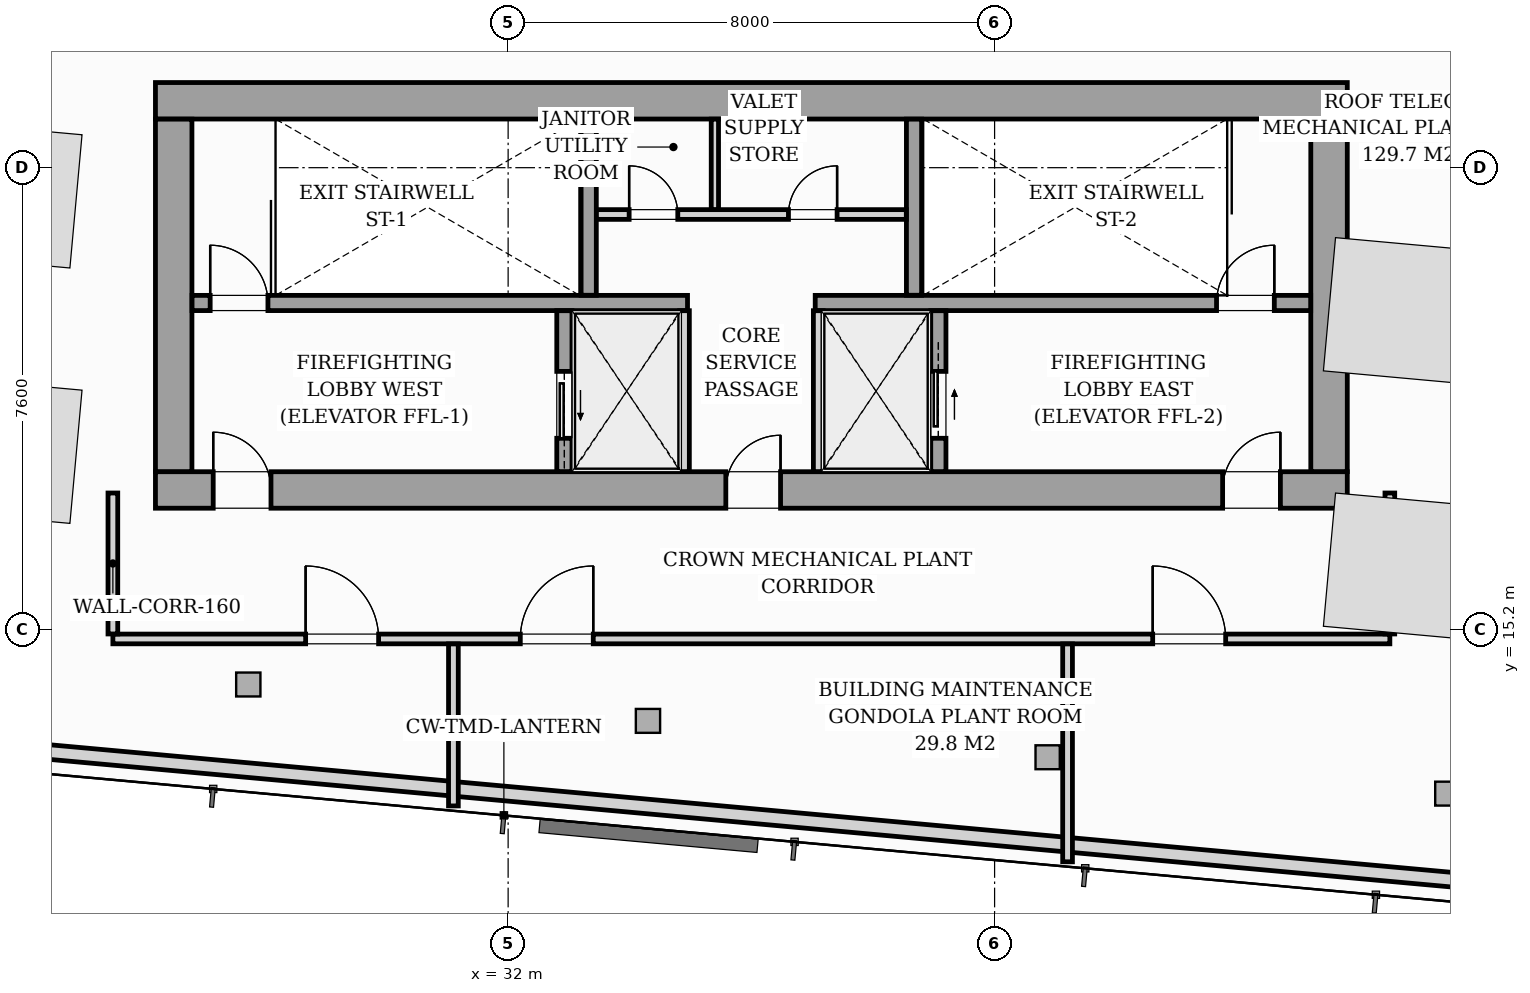
"""IFC4 building model, lengths in metres.
Left out: names, types, materials, properties, quantities, classifications, styles, units other than length and angle.
Written with IfcOpenShell. Run it as: python <this file> out.ifc"""

import sys

from ifc_helpers import new_model, si_unit, direction, frame, frame_2d, origin, origin_2d, place, context, subcontext, project, spatial, rectangle, i_section, extrude, source, transform, mapped, element, fill, save


model = new_model("IFC4")
c1 = context("Model", 3, precision=1e-05, world=origin(), true_north=direction((0.0, 1.0)))
c2 = subcontext(c1, "Body", "Model", "MODEL_VIEW")
j1 = project(units=[si_unit("LENGTHUNIT", "METRE"), si_unit("PLANEANGLEUNIT", "RADIAN")], contexts=[c1])
p1 = place(None, origin())
s1 = spatial("IfcSite", under=j1, at=p1, CompositionType="ELEMENT")
p2 = place(p1, origin())
s2 = spatial("IfcBuilding", under=s1, at=p2, CompositionType="ELEMENT")
p3 = place(p2, frame((0.0, 0.0, 290.3)))
s3 = spatial("IfcBuildingStorey", under=s2, at=p3, CompositionType="ELEMENT", Elevation=290.3)
m1 = source(origin(), c2, "Body", "SweptSolid", [
    extrude(i_section(OverallWidth=0.404, OverallDepth=0.407, WebThickness=0.027, FlangeThickness=0.044, FilletRadius=0.018, at=origin_2d()), origin(), (0.0, 0.0, 1.0), 6.496),
])
for number, where, z_axis, x_axis in (
    (1, (26.4, 17.4, 0.002), (0.0, 0.0, 1.0), (1.0, 0.0, 0.0)),
    (2, (33.12, 17.4, 0.002), (0.0, 0.0, 1.0), (1.0, 0.0, 0.0)),
    (3, (38.88, 17.4, 0.002), (0.0, 0.0, 1.0), (1.0, 0.0, 0.0)),
    (4, (45.6, 17.4, 0.002), (0.0, 0.0, 1.0), (1.0, 0.0, 0.0)),
    (5, (26.4, 24.0, 0.002), (0.0, 0.0, 1.0), (1.0, 0.0, 0.0)),
    (6, (33.12, 24.0, 0.002), (0.0, 0.0, 1.0), (1.0, 0.0, 0.0)),
    (7, (38.88, 24.0, 0.002), (0.0, 0.0, 1.0), (1.0, 0.0, 0.0)),
    (8, (45.6, 24.0, 0.002), (0.0, 0.0, 1.0), (1.0, 0.0, 0.0)),
):
    element("IfcColumn", number, at=place(p3, frame(where, z_axis=z_axis, x_axis=x_axis)), inside=s3, PredefinedType="PILASTER", context=c2, shape_type="MappedRepresentation", body=[
        mapped(m1, transform((0.0, 0.0, 0.0), scale=1.0)),
    ])
m2 = source(origin(), c2, "Body", "SweptSolid", [
    extrude(i_section(OverallWidth=0.399, OverallDepth=0.393, WebThickness=0.023, FlangeThickness=0.037, FilletRadius=0.018, at=origin_2d()), origin(), (0.0, 0.0, 1.0), 6.496),
])
for number, where, z_axis, x_axis in (
    (9, (27.727, 14.301, 0.002), (0.0, 0.0, 1.0), (0.996, -0.091, 0.0)),
    (10, (34.3, 13.703, 0.002), (0.0, 0.0, 1.0), (0.996, -0.091, 0.0)),
    (11, (40.873, 13.104, 0.002), (0.0, 0.0, 1.0), (0.996, -0.091, 0.0)),
    (12, (47.445, 12.506, 0.002), (0.0, 0.0, 1.0), (0.996, -0.091, 0.0)),
):
    element("IfcColumn", number, at=place(p3, frame(where, z_axis=z_axis, x_axis=x_axis)), inside=s3, PredefinedType="COLUMN", context=c2, shape_type="MappedRepresentation", body=[
        mapped(m2, transform((0.0, 0.0, 0.0), scale=1.0)),
    ])
p4 = place(p3, frame((50.725, 10.799, 6.5), z_axis=(0.0, 0.0, 1.0), x_axis=(-0.995884437615, 0.090632151664, 0.0)))
e13 = element("IfcWall", 13, at=p4, inside=s3, PredefinedType="PARAPET", context=c2, shape_type="SweptSolid", body=[
    extrude(rectangle(XDim=32.88, YDim=0.24, at=frame_2d((16.44, 0.0))), origin(), (0.0, 0.0, 1.0), 1.25),
])
p5 = place(p3, frame((26.2, 17.5, 0.0), z_axis=(0.0, 0.0, 1.0), x_axis=(1.0, 0.0, 0.0)))
e14 = element("IfcWall", 14, at=p5, inside=s3, PredefinedType="SHEAR", context=c2, shape_type="SweptSolid", body=[
    extrude(rectangle(XDim=19.6, YDim=0.6, at=frame_2d((9.8, 0.0))), origin(), (0.0, 0.0, 1.0), 6.5),
])
p6 = place(p5, frame((0.95, 0.0, 0.0)))
e15 = element("IfcOpeningElement", 15, at=p6, cuts=e14, PredefinedType="OPENING", context=c2, shape_type="SweptSolid", body=[
    extrude(rectangle(XDim=0.95, YDim=2.06, at=frame_2d((0.475, 1.03))), frame((0.0, 0.31, 0.0), z_axis=(0.0, -1.0, 0.0), x_axis=(1.0, 0.0, 0.0)), (0.0, 0.0, 1.0), 0.62),
])
p7 = place(p5, frame((9.38, 0.0, 0.0)))
e16 = element("IfcOpeningElement", 16, at=p7, cuts=e14, PredefinedType="OPENING", context=c2, shape_type="SweptSolid", body=[
    extrude(rectangle(XDim=0.9, YDim=2.06, at=frame_2d((0.45, 1.03))), frame((0.0, 0.31, 0.0), z_axis=(0.0, -1.0, 0.0), x_axis=(1.0, 0.0, 0.0)), (0.0, 0.0, 1.0), 0.62),
])
p8 = place(p5, frame((17.55, 0.0, 0.0)))
e17 = element("IfcOpeningElement", 17, at=p8, cuts=e14, PredefinedType="OPENING", context=c2, shape_type="SweptSolid", body=[
    extrude(rectangle(XDim=0.95, YDim=2.06, at=frame_2d((0.475, 1.03))), frame((0.0, 0.31, 0.0), z_axis=(0.0, -1.0, 0.0), x_axis=(1.0, 0.0, 0.0)), (0.0, 0.0, 1.0), 0.62),
])
p9 = place(p3, frame((26.2, 23.9, 0.0), z_axis=(0.0, 0.0, 1.0), x_axis=(1.0, 0.0, 0.0)))
e18 = element("IfcWall", 18, at=p9, inside=s3, PredefinedType="SHEAR", context=c2, shape_type="SweptSolid", body=[
    extrude(rectangle(XDim=19.6, YDim=0.6, at=frame_2d((9.8, 0.0))), origin(), (0.0, 0.0, 1.0), 6.5),
])
for number, where, z_axis, x_axis in (
    (19, (26.5, 17.802, 0.0), (0.0, 0.0, 1.0), (0.0, 1.0, 0.0)),
    (20, (45.5, 17.802, 0.0), (0.0, 0.0, 1.0), (0.0, 1.0, 0.0)),
):
    element("IfcWall", number, at=place(p3, frame(where, z_axis=z_axis, x_axis=x_axis)), inside=s3, PredefinedType="SHEAR", context=c2, shape_type="SweptSolid", body=[
        extrude(rectangle(XDim=5.796, YDim=0.6, at=frame_2d((2.898, 0.0))), origin(), (0.0, 0.0, 1.0), 6.5),
    ])
p10 = place(p3, frame((26.802, 20.575, 0.0), z_axis=(0.0, 0.0, 1.0), x_axis=(1.0, 0.0, 0.0)))
e21 = element("IfcWall", 21, at=p10, inside=s3, PredefinedType="SOLIDWALL", context=c2, shape_type="SweptSolid", body=[
    extrude(rectangle(XDim=8.148, YDim=0.25, at=frame_2d((4.074, 0.0))), origin(), (0.0, 0.0, 1.0), 6.5),
])
p11 = place(p10, frame((0.298, 0.0, 0.0)))
e22 = element("IfcOpeningElement", 22, at=p11, cuts=e21, PredefinedType="OPENING", context=c2, shape_type="SweptSolid", body=[
    extrude(rectangle(XDim=0.95, YDim=2.06, at=frame_2d((0.475, 1.03))), frame((0.0, 0.135, 0.0), z_axis=(0.0, -1.0, 0.0), x_axis=(1.0, 0.0, 0.0)), (0.0, 0.0, 1.0), 0.27),
])
p12 = place(p3, frame((37.05, 20.575, 0.0), z_axis=(0.0, 0.0, 1.0), x_axis=(1.0, 0.0, 0.0)))
e23 = element("IfcWall", 23, at=p12, inside=s3, PredefinedType="SOLIDWALL", context=c2, shape_type="SweptSolid", body=[
    extrude(rectangle(XDim=8.148, YDim=0.25, at=frame_2d((4.074, 0.0))), origin(), (0.0, 0.0, 1.0), 6.5),
])
p13 = place(p12, frame((6.6, 0.0, 0.0)))
e24 = element("IfcOpeningElement", 24, at=p13, cuts=e23, PredefinedType="OPENING", context=c2, shape_type="SweptSolid", body=[
    extrude(rectangle(XDim=0.95, YDim=2.06, at=frame_2d((0.475, 1.03))), frame((0.0, 0.135, 0.0), z_axis=(0.0, -1.0, 0.0), x_axis=(1.0, 0.0, 0.0)), (0.0, 0.0, 1.0), 0.27),
])
for number, where, z_axis, x_axis in (
    (25, (33.325, 20.702, 0.0), (0.0, 0.0, 1.0), (0.0, 1.0, 0.0)),
    (26, (38.675, 20.702, 0.0), (0.0, 0.0, 1.0), (0.0, 1.0, 0.0)),
):
    element("IfcWall", number, at=place(p3, frame(where, z_axis=z_axis, x_axis=x_axis)), inside=s3, PredefinedType="SOLIDWALL", context=c2, shape_type="SweptSolid", body=[
        extrude(rectangle(XDim=2.896, YDim=0.25, at=frame_2d((1.448, 0.0))), origin(), (0.0, 0.0, 1.0), 6.5),
    ])
p14 = place(p3, frame((32.925, 17.802, 0.0), z_axis=(0.0, 0.0, 1.0), x_axis=(0.0, 1.0, 0.0)))
e27 = element("IfcWall", 27, at=p14, inside=s3, PredefinedType="SOLIDWALL", context=c2, shape_type="SweptSolid", body=[
    extrude(rectangle(XDim=2.646, YDim=0.25, at=frame_2d((1.323, 0.0))), origin(), (0.0, 0.0, 1.0), 6.5),
])
p15 = place(p14, frame((0.548, 0.0, 0.0)))
e28 = element("IfcOpeningElement", 28, at=p15, cuts=e27, PredefinedType="OPENING", context=c2, shape_type="SweptSolid", body=[
    extrude(rectangle(XDim=1.1, YDim=2.08, at=frame_2d((0.55, 1.04))), frame((0.0, 0.135, 0.0), z_axis=(0.0, -1.0, 0.0), x_axis=(1.0, 0.0, 0.0)), (0.0, 0.0, 1.0), 0.27),
])
for number, where, z_axis, x_axis in (
    (29, (34.9, 17.802, 0.0), (0.0, 0.0, 1.0), (0.0, 1.0, 0.0)),
    (30, (37.1, 17.802, 0.0), (0.0, 0.0, 1.0), (0.0, 1.0, 0.0)),
):
    element("IfcWall", number, at=place(p3, frame(where, z_axis=z_axis, x_axis=x_axis)), inside=s3, PredefinedType="PARTITIONING", context=c2, shape_type="SweptSolid", body=[
        extrude(rectangle(XDim=2.646, YDim=0.16, at=frame_2d((1.323, 0.0))), origin(), (0.0, 0.0, 1.0), 6.22),
    ])
p16 = place(p3, frame((39.075, 17.802, 0.0), z_axis=(0.0, 0.0, 1.0), x_axis=(0.0, 1.0, 0.0)))
e31 = element("IfcWall", 31, at=p16, inside=s3, PredefinedType="SOLIDWALL", context=c2, shape_type="SweptSolid", body=[
    extrude(rectangle(XDim=2.646, YDim=0.25, at=frame_2d((1.323, 0.0))), origin(), (0.0, 0.0, 1.0), 6.5),
])
p17 = place(p16, frame((0.548, 0.0, 0.0)))
e32 = element("IfcOpeningElement", 32, at=p17, cuts=e31, PredefinedType="OPENING", context=c2, shape_type="SweptSolid", body=[
    extrude(rectangle(XDim=1.1, YDim=2.08, at=frame_2d((0.55, 1.04))), frame((0.0, 0.135, 0.0), z_axis=(0.0, -1.0, 0.0), x_axis=(1.0, 0.0, 0.0)), (0.0, 0.0, 1.0), 0.27),
])
p18 = place(p3, frame((33.452, 22.03, 0.0), z_axis=(0.0, 0.0, 1.0), x_axis=(1.0, 0.0, 0.0)))
e33 = element("IfcWall", 33, at=p18, inside=s3, PredefinedType="PARTITIONING", context=c2, shape_type="SweptSolid", body=[
    extrude(rectangle(XDim=5.096, YDim=0.16, at=frame_2d((2.548, 0.0))), origin(), (0.0, 0.0, 1.0), 6.22),
])
p19 = place(p18, frame((0.538, 0.0, 0.0)))
e34 = element("IfcOpeningElement", 34, at=p19, cuts=e33, PredefinedType="OPENING", context=c2, shape_type="SweptSolid", body=[
    extrude(rectangle(XDim=0.8, YDim=2.05, at=frame_2d((0.4, 1.025))), frame((0.0, 0.09, 0.0), z_axis=(0.0, -1.0, 0.0), x_axis=(1.0, 0.0, 0.0)), (0.0, 0.0, 1.0), 0.18),
])
p20 = place(p18, frame((3.158, 0.0, 0.0)))
e35 = element("IfcOpeningElement", 35, at=p20, cuts=e33, PredefinedType="OPENING", context=c2, shape_type="SweptSolid", body=[
    extrude(rectangle(XDim=0.8, YDim=2.05, at=frame_2d((0.4, 1.025))), frame((0.0, 0.09, 0.0), z_axis=(0.0, -1.0, 0.0), x_axis=(1.0, 0.0, 0.0)), (0.0, 0.0, 1.0), 0.18),
])
p21 = place(p3, frame((35.4, 22.112, 0.0), z_axis=(0.0, 0.0, 1.0), x_axis=(0.0, 1.0, 0.0)))
e36 = element("IfcWall", 36, at=p21, inside=s3, PredefinedType="PARTITIONING", context=c2, shape_type="SweptSolid", body=[
    extrude(rectangle(XDim=1.486, YDim=0.12, at=frame_2d((0.743, 0.0))), origin(), (0.0, 0.0, 1.0), 6.22),
])
p22 = place(p3, frame((25.5, 15.05, 0.0), z_axis=(0.0, 0.0, 1.0), x_axis=(1.0, 0.0, 0.0)))
e37 = element("IfcWall", 37, at=p22, inside=s3, PredefinedType="PARTITIONING", context=c2, shape_type="SweptSolid", body=[
    extrude(rectangle(XDim=21.0, YDim=0.16, at=frame_2d((10.5, 0.0))), origin(), (0.0, 0.0, 1.0), 5.948),
])
p23 = place(p22, frame((3.17, 0.0, 0.0)))
e38 = element("IfcOpeningElement", 38, at=p23, cuts=e37, PredefinedType="OPENING", context=c2, shape_type="SweptSolid", body=[
    extrude(rectangle(XDim=1.2, YDim=2.08, at=frame_2d((0.6, 1.04))), frame((0.0, 0.09, 0.0), z_axis=(0.0, -1.0, 0.0), x_axis=(1.0, 0.0, 0.0)), (0.0, 0.0, 1.0), 0.18),
])
p24 = place(p22, frame((6.7, 0.0, 0.0)))
e39 = element("IfcOpeningElement", 39, at=p24, cuts=e37, PredefinedType="OPENING", context=c2, shape_type="SweptSolid", body=[
    extrude(rectangle(XDim=1.2, YDim=2.08, at=frame_2d((0.6, 1.04))), frame((0.0, 0.09, 0.0), z_axis=(0.0, -1.0, 0.0), x_axis=(1.0, 0.0, 0.0)), (0.0, 0.0, 1.0), 0.18),
])
p25 = place(p22, frame((17.1, 0.0, 0.0)))
e40 = element("IfcOpeningElement", 40, at=p25, cuts=e37, PredefinedType="OPENING", context=c2, shape_type="SweptSolid", body=[
    extrude(rectangle(XDim=1.2, YDim=2.08, at=frame_2d((0.6, 1.04))), frame((0.0, 0.09, 0.0), z_axis=(0.0, -1.0, 0.0), x_axis=(1.0, 0.0, 0.0)), (0.0, 0.0, 1.0), 0.18),
])
for number, where, z_axis, x_axis in (
    (41, (25.5, 15.132, 0.0), (0.0, 0.0, 1.0), (0.0, 1.0, 0.0)),
    (42, (46.5, 15.132, 0.0), (0.0, 0.0, 1.0), (0.0, 1.0, 0.0)),
):
    element("IfcWall", number, at=place(p3, frame(where, z_axis=z_axis, x_axis=x_axis)), inside=s3, PredefinedType="PARTITIONING", context=c2, shape_type="SweptSolid", body=[
        extrude(rectangle(XDim=2.318, YDim=0.16, at=frame_2d((1.159, 0.0))), origin(), (0.0, 0.0, 1.0), 6.22),
    ])
p26 = place(p3, frame((31.1, 12.304, 0.0), z_axis=(0.0, 0.0, 1.0), x_axis=(0.0, 1.0, 0.0)))
e43 = element("IfcWall", 43, at=p26, inside=s3, PredefinedType="PARTITIONING", context=c2, shape_type="SweptSolid", body=[
    extrude(rectangle(XDim=2.664, YDim=0.16, at=frame_2d((1.332, 0.0))), origin(), (0.0, 0.0, 1.0), 6.22),
])
p27 = place(p3, frame((41.2, 11.385, 0.0), z_axis=(0.0, 0.0, 1.0), x_axis=(0.0, 1.0, 0.0)))
e44 = element("IfcWall", 44, at=p27, inside=s3, PredefinedType="PARTITIONING", context=c2, shape_type="SweptSolid", body=[
    extrude(rectangle(XDim=3.583, YDim=0.16, at=frame_2d((1.792, 0.0))), origin(), (0.0, 0.0, 1.0), 6.22),
])
m3 = source(origin(), c2, "Body", "SweptSolid", [
    extrude(rectangle(XDim=0.95, YDim=2.06, at=frame_2d((0.475, 1.03))), frame((0.0, 0.025, 0.0), z_axis=(0.0, -1.0, 0.0), x_axis=(1.0, 0.0, 0.0)), (0.0, 0.0, 1.0), 0.05),
])
p28 = place(p6, origin())
e45 = element("IfcDoor", 45, at=p28, inside=s3, OperationType="SINGLE_SWING_LEFT", PredefinedType="DOOR", context=c2, shape_type="MappedRepresentation", body=[
    mapped(m3, transform((0.0, 0.0, 0.0), scale=1.0)),
])
fill(e15, e45)
m4 = source(origin(), c2, "Body", "SweptSolid", [
    extrude(rectangle(XDim=0.9, YDim=2.06, at=frame_2d((0.45, 1.03))), frame((0.0, 0.025, 0.0), z_axis=(0.0, -1.0, 0.0), x_axis=(1.0, 0.0, 0.0)), (0.0, 0.0, 1.0), 0.05),
])
p29 = place(p7, origin())
e46 = element("IfcDoor", 46, at=p29, inside=s3, OperationType="SINGLE_SWING_RIGHT", PredefinedType="DOOR", context=c2, shape_type="MappedRepresentation", body=[
    mapped(m4, transform((0.0, 0.0, 0.0), scale=1.0)),
])
fill(e16, e46)
p30 = place(p8, origin())
e47 = element("IfcDoor", 47, at=p30, inside=s3, OperationType="SINGLE_SWING_RIGHT", PredefinedType="DOOR", context=c2, shape_type="MappedRepresentation", body=[
    mapped(m3, transform((0.0, 0.0, 0.0), scale=1.0)),
])
fill(e17, e47)
p31 = place(p11, origin())
e48 = element("IfcDoor", 48, at=p31, inside=s3, OperationType="SINGLE_SWING_LEFT", PredefinedType="DOOR", context=c2, shape_type="MappedRepresentation", body=[
    mapped(m3, transform((0.0, 0.0, 0.0), scale=1.0)),
])
fill(e22, e48)
p32 = place(p13, origin())
e49 = element("IfcDoor", 49, at=p32, inside=s3, OperationType="SINGLE_SWING_RIGHT", PredefinedType="DOOR", context=c2, shape_type="MappedRepresentation", body=[
    mapped(m3, transform((0.0, 0.0, 0.0), scale=1.0)),
])
fill(e24, e49)
m5 = source(origin(), c2, "Body", "SweptSolid", [
    extrude(rectangle(XDim=1.1, YDim=2.08, at=frame_2d((0.55, 1.04))), frame((0.0, 0.025, 0.0), z_axis=(0.0, -1.0, 0.0), x_axis=(1.0, 0.0, 0.0)), (0.0, 0.0, 1.0), 0.05),
])
p33 = place(p15, origin())
e50 = element("IfcDoor", 50, at=p33, inside=s3, OperationType="SLIDING_TO_LEFT", PredefinedType="DOOR", context=c2, shape_type="MappedRepresentation", body=[
    mapped(m5, transform((0.0, 0.0, 0.0), scale=1.0)),
])
fill(e28, e50)
p34 = place(p17, origin())
e51 = element("IfcDoor", 51, at=p34, inside=s3, OperationType="SLIDING_TO_RIGHT", PredefinedType="DOOR", context=c2, shape_type="MappedRepresentation", body=[
    mapped(m5, transform((0.0, 0.0, 0.0), scale=1.0)),
])
fill(e32, e51)
m6 = source(origin(), c2, "Body", "SweptSolid", [
    extrude(rectangle(XDim=0.8, YDim=2.05, at=frame_2d((0.4, 1.025))), frame((0.0, 0.025, 0.0), z_axis=(0.0, -1.0, 0.0), x_axis=(1.0, 0.0, 0.0)), (0.0, 0.0, 1.0), 0.05),
])
p35 = place(p19, origin())
e52 = element("IfcDoor", 52, at=p35, inside=s3, OperationType="SINGLE_SWING_LEFT", PredefinedType="DOOR", context=c2, shape_type="MappedRepresentation", body=[
    mapped(m6, transform((0.0, 0.0, 0.0), scale=1.0)),
])
fill(e34, e52)
p36 = place(p20, origin())
e53 = element("IfcDoor", 53, at=p36, inside=s3, OperationType="SINGLE_SWING_RIGHT", PredefinedType="DOOR", context=c2, shape_type="MappedRepresentation", body=[
    mapped(m6, transform((0.0, 0.0, 0.0), scale=1.0)),
])
fill(e35, e53)
m7 = source(origin(), c2, "Body", "SweptSolid", [
    extrude(rectangle(XDim=1.2, YDim=2.08, at=frame_2d((0.6, 1.04))), frame((0.0, 0.025, 0.0), z_axis=(0.0, -1.0, 0.0), x_axis=(1.0, 0.0, 0.0)), (0.0, 0.0, 1.0), 0.05),
])
p37 = place(p23, origin())
e54 = element("IfcDoor", 54, at=p37, inside=s3, OperationType="SINGLE_SWING_LEFT", PredefinedType="DOOR", context=c2, shape_type="MappedRepresentation", body=[
    mapped(m7, transform((0.0, 0.0, 0.0), scale=1.0)),
])
fill(e38, e54)
p38 = place(p24, origin())
e55 = element("IfcDoor", 55, at=p38, inside=s3, OperationType="SINGLE_SWING_RIGHT", PredefinedType="DOOR", context=c2, shape_type="MappedRepresentation", body=[
    mapped(m7, transform((0.0, 0.0, 0.0), scale=1.0)),
])
fill(e39, e55)
p39 = place(p25, origin())
e56 = element("IfcDoor", 56, at=p39, inside=s3, OperationType="SINGLE_SWING_LEFT", PredefinedType="DOOR", context=c2, shape_type="MappedRepresentation", body=[
    mapped(m7, transform((0.0, 0.0, 0.0), scale=1.0)),
])
fill(e40, e56)
save(model, sys.argv[1])
